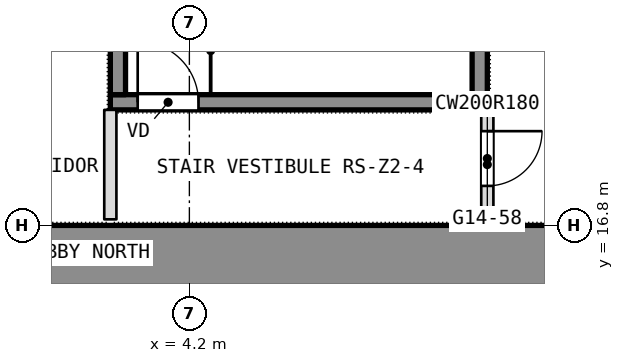
"""IFC4 building model, lengths in metres.
Left out: names, types, materials, properties, quantities, classifications, styles, units other than length and angle.
Written with IfcOpenShell. Run it as: python <this file> out.ifc"""

import sys

from ifc_helpers import new_model, si_unit, direction, frame, frame_2d, origin, place, context, subcontext, project, spatial, rectangle, extrude, element, fill, save


model = new_model("IFC4")
c1 = context("Model", 3, precision=1e-05, world=origin(), true_north=direction((0.0, 1.0)))
c2 = subcontext(c1, "Body", "Model", "MODEL_VIEW")
j1 = project(units=[si_unit("LENGTHUNIT", "METRE"), si_unit("PLANEANGLEUNIT", "RADIAN")], contexts=[c1])
p1 = place(None, origin())
s1 = spatial("IfcSite", under=j1, at=p1, CompositionType="ELEMENT")
p2 = place(p1, origin())
s2 = spatial("IfcBuilding", under=s1, at=p2, CompositionType="ELEMENT")
p3 = place(p2, frame((0.0, 0.0, 166.1)))
s3 = spatial("IfcBuildingStorey", under=s2, at=p3, CompositionType="ELEMENT", Elevation=166.1)
p4 = place(p3, frame((-11.1, 16.3, 0.0), z_axis=(0.0, 0.0, 1.0), x_axis=(1.0, 0.0, 0.0)))
e1 = element("IfcWall", 1, at=p4, inside=s3, PredefinedType="SHEAR", context=c2, shape_type="SweptSolid", body=[
    extrude(rectangle(XDim=22.2, YDim=1.0, at=frame_2d((11.1, 0.0))), origin(), (0.0, 0.0, 1.0), 3.6),
])
p5 = place(p3, frame((9.1, 16.9, 0.0), z_axis=(0.0, 0.0, 1.0), x_axis=(0.0, 1.0, 0.0)))
e2 = element("IfcWall", 2, at=p5, inside=s3, PredefinedType="PARTITIONING", context=c2, shape_type="SweptSolid", body=[
    extrude(rectangle(XDim=1.8, YDim=0.2, at=frame_2d((0.9, 0.0))), origin(), (0.0, 0.0, 1.0), 3.3),
])
p6 = place(p5, frame((0.55, 0.0, 0.0)))
e3 = element("IfcOpeningElement", 3, at=p6, cuts=e2, PredefinedType="OPENING", context=c2, shape_type="SweptSolid", body=[
    extrude(rectangle(XDim=0.9, YDim=2.1, at=frame_2d((0.45, 1.05))), frame((0.0, 0.1, 0.0), z_axis=(0.0, -1.0, 0.0), x_axis=(1.0, 0.0, 0.0)), (0.0, 0.0, 1.0), 0.2),
])
p7 = place(p3, frame((2.9, 16.9, 0.0), z_axis=(0.0, 0.0, 1.0), x_axis=(0.0, 1.0, 0.0)))
e4 = element("IfcWall", 4, at=p7, inside=s3, PredefinedType="PARTITIONING", context=c2, shape_type="SweptSolid", body=[
    extrude(rectangle(XDim=1.8, YDim=0.2, at=frame_2d((0.9, 0.0))), origin(), (0.0, 0.0, 1.0), 3.3),
])
p8 = place(p3, frame((2.9, 18.825, 0.1), z_axis=(0.0, 0.0, 1.0), x_axis=(1.0, 0.0, 0.0)))
e5 = element("IfcWall", 5, at=p8, inside=s3, PredefinedType="SHEAR", context=c2, shape_type="SweptSolid", body=[
    extrude(rectangle(XDim=6.2, YDim=0.25, at=frame_2d((3.1, 0.0))), origin(), (0.0, 0.0, 1.0), 3.2),
])
p9 = place(p8, frame((0.45, 0.0, 0.0)))
e6 = element("IfcOpeningElement", 6, at=p9, cuts=e5, PredefinedType="OPENING", context=c2, shape_type="SweptSolid", body=[
    extrude(rectangle(XDim=1.0, YDim=2.1, at=frame_2d((0.5, 1.05))), frame((0.0, 0.125, 0.0), z_axis=(0.0, -1.0, 0.0), x_axis=(1.0, 0.0, 0.0)), (0.0, 0.0, 1.0), 0.25),
])
for number, where, z_axis, x_axis in (
    (7, (3.025, 18.95, 0.1), (0.0, 0.0, 1.0), (0.0, 1.0, 0.0)),
    (8, (8.975, 18.95, 0.1), (0.0, 0.0, 1.0), (0.0, 1.0, 0.0)),
):
    element("IfcWall", number, at=place(p3, frame(where, z_axis=z_axis, x_axis=x_axis)), inside=s3, PredefinedType="SHEAR", context=c2, shape_type="SweptSolid", body=[
        extrude(rectangle(XDim=2.9, YDim=0.25, at=frame_2d((1.45, 0.0))), origin(), (0.0, 0.0, 1.0), 3.2),
    ])
p10 = place(p6, origin())
e9 = element("IfcDoor", 9, at=p10, inside=s3, OperationType="SINGLE_SWING_RIGHT", PredefinedType="DOOR", context=c2, shape_type="SweptSolid", body=[
    extrude(rectangle(XDim=0.9, YDim=2.1, at=frame_2d((0.45, 1.05))), frame((0.0, 0.025, 0.0), z_axis=(0.0, -1.0, 0.0), x_axis=(1.0, 0.0, 0.0)), (0.0, 0.0, 1.0), 0.05),
])
fill(e3, e9)
p11 = place(p9, origin())
e10 = element("IfcDoor", 10, at=p11, inside=s3, OperationType="SINGLE_SWING_LEFT", PredefinedType="DOOR", context=c2, shape_type="SweptSolid", body=[
    extrude(rectangle(XDim=1.0, YDim=2.1, at=frame_2d((0.5, 1.05))), frame((0.0, 0.025, 0.0), z_axis=(0.0, -1.0, 0.0), x_axis=(1.0, 0.0, 0.0)), (0.0, 0.0, 1.0), 0.05),
])
fill(e6, e10)
save(model, sys.argv[1])
